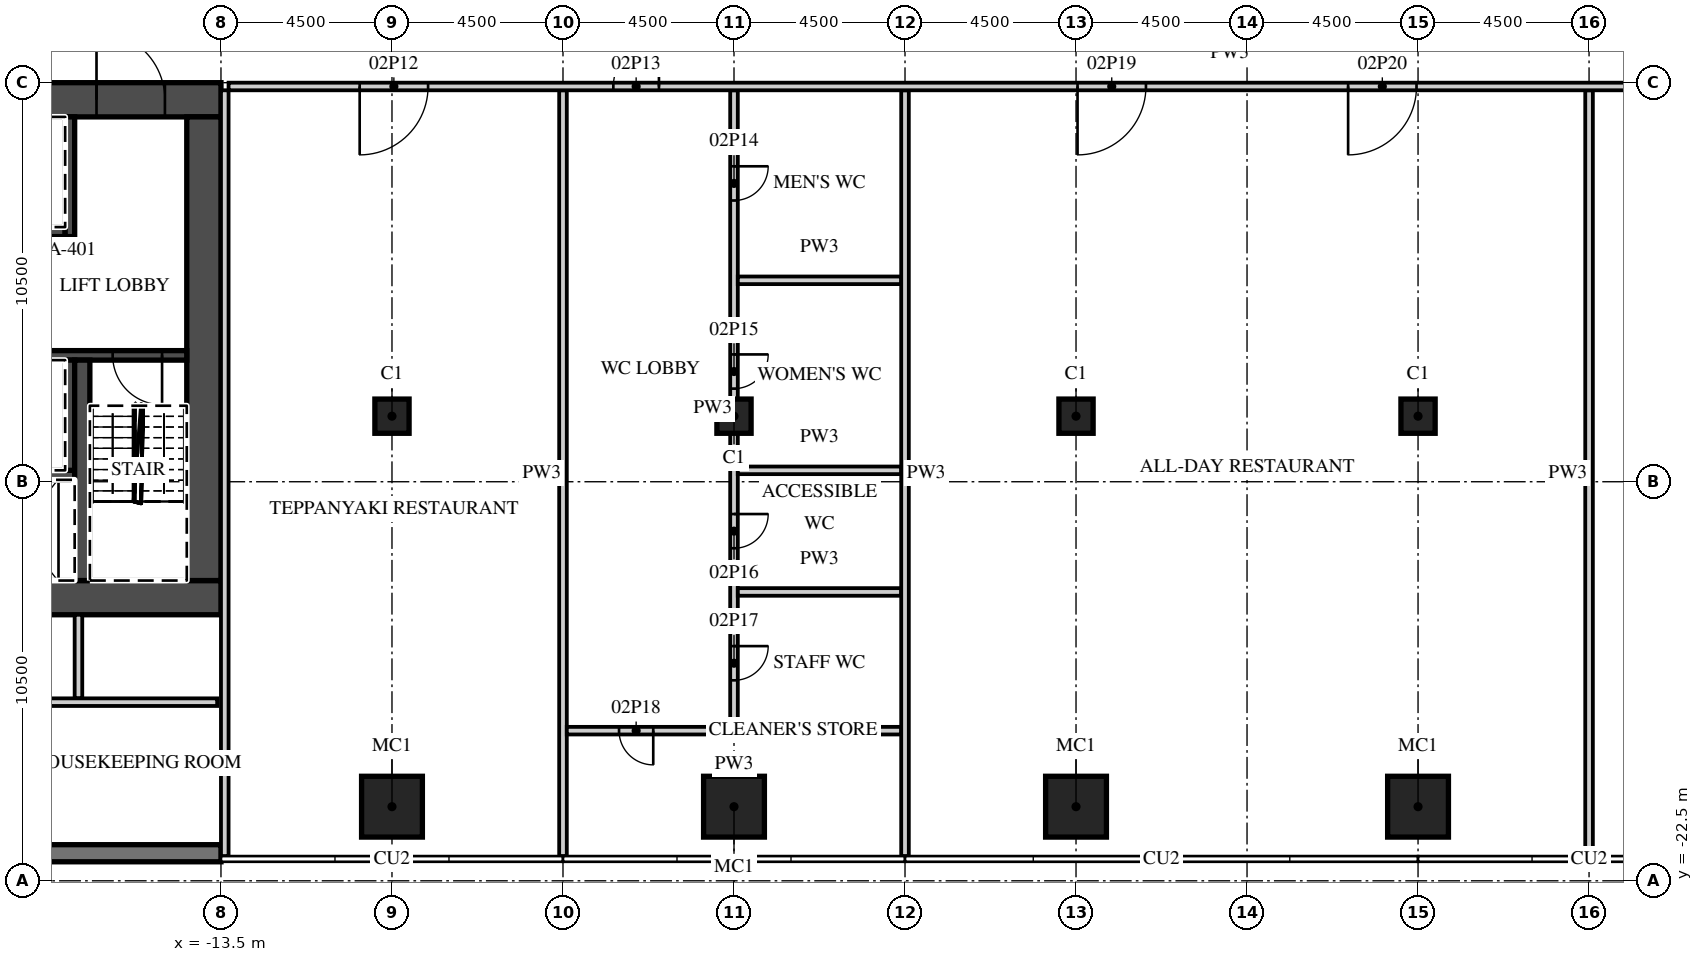
"""IFC4 building model, lengths in metres.
Left out: names, types, materials, properties, quantities, classifications, styles, units other than length and angle.
Written with IfcOpenShell. Run it as: python <this file> out.ifc"""

import sys

from ifc_helpers import new_model, si_unit, direction, frame, frame_2d, origin, origin_2d, place, context, subcontext, project, spatial, rectangle, extrude, element, fill, save


model = new_model("IFC4")
c1 = context("Model", 3, precision=1e-05, world=origin(), true_north=direction((0.0, 1.0)))
c2 = subcontext(c1, "Body", "Model", "MODEL_VIEW")
j1 = project(units=[si_unit("LENGTHUNIT", "METRE"), si_unit("PLANEANGLEUNIT", "RADIAN")], contexts=[c1])
p1 = place(None, origin())
s1 = spatial("IfcSite", under=j1, at=p1, CompositionType="ELEMENT")
p2 = place(p1, origin())
s2 = spatial("IfcBuilding", under=s1, at=p2, CompositionType="ELEMENT")
p3 = place(p2, frame((0.0, 0.0, 17.0)))
s3 = spatial("IfcBuildingStorey", under=s2, at=p3, CompositionType="ELEMENT", Elevation=17.0)
for number, where, z_axis, x_axis in (
    (1, (-9.0, -20.55, 0.0), (0.0, 0.0, 1.0), (1.0, 0.0, 0.0)),
    (2, (0.0, -20.55, 0.0), (0.0, 0.0, 1.0), (1.0, 0.0, 0.0)),
    (3, (9.0, -20.55, 0.0), (0.0, 0.0, 1.0), (1.0, 0.0, 0.0)),
    (4, (18.0, -20.55, 0.0), (0.0, 0.0, 1.0), (1.0, 0.0, 0.0)),
):
    element("IfcColumn", number, at=place(p3, frame(where, z_axis=z_axis, x_axis=x_axis)), inside=s3, PredefinedType="COLUMN", context=c2, shape_type="SweptSolid", body=[
        extrude(rectangle(XDim=1.6, YDim=1.6, at=origin_2d()), origin(), (0.0, 0.0, 1.0), 6.5),
    ])
for number, where, z_axis, x_axis in (
    (5, (-9.0, -10.275, 0.0), (0.0, 0.0, 1.0), (1.0, 0.0, 0.0)),
    (6, (0.0, -10.275, 0.0), (0.0, 0.0, 1.0), (1.0, 0.0, 0.0)),
    (7, (9.0, -10.275, 0.0), (0.0, 0.0, 1.0), (1.0, 0.0, 0.0)),
    (8, (18.0, -10.275, 0.0), (0.0, 0.0, 1.0), (1.0, 0.0, 0.0)),
):
    element("IfcColumn", number, at=place(p3, frame(where, z_axis=z_axis, x_axis=x_axis)), inside=s3, PredefinedType="COLUMN", context=c2, shape_type="SweptSolid", body=[
        extrude(rectangle(XDim=0.9, YDim=0.9, at=origin_2d()), origin(), (0.0, 0.0, 1.0), 6.5),
    ])
p4 = place(p3, frame((-31.5, -21.775, 0.0), z_axis=(0.0, 0.0, 1.0), x_axis=(1.0, 0.0, 0.0)))
e9 = element("IfcWall", 9, at=p4, inside=s3, PredefinedType="SOLIDWALL", context=c2, shape_type="SweptSolid", body=[
    extrude(rectangle(XDim=18.0, YDim=0.45, at=frame_2d((9.0, 0.0))), origin(), (0.0, 0.0, 1.0), 6.05),
])
p5 = place(p3, frame((-31.5, -1.95, 0.0), z_axis=(0.0, 0.0, 1.0), x_axis=(1.0, 0.0, 0.0)))
e10 = element("IfcWall", 10, at=p5, inside=s3, PredefinedType="SHEAR", context=c2, shape_type="SweptSolid", body=[
    extrude(rectangle(XDim=18.0, YDim=0.9, at=frame_2d((9.0, 0.0))), origin(), (0.0, 0.0, 1.0), 6.05),
])
p6 = place(p5, frame((14.725, 0.0, 0.0)))
e11 = element("IfcOpeningElement", 11, at=p6, cuts=e10, PredefinedType="OPENING", context=c2, shape_type="SweptSolid", body=[
    extrude(rectangle(XDim=1.8, YDim=2.1, at=frame_2d((0.9, 1.05))), frame((0.0, 0.46, 0.0), z_axis=(0.0, -1.0, 0.0), x_axis=(1.0, 0.0, 0.0)), (0.0, 0.0, 1.0), 0.92),
])
p7 = place(p3, frame((-20.3, -15.05, 0.0), z_axis=(0.0, 0.0, 1.0), x_axis=(1.0, 0.0, 0.0)))
e12 = element("IfcWall", 12, at=p7, inside=s3, PredefinedType="SHEAR", context=c2, shape_type="SweptSolid", body=[
    extrude(rectangle(XDim=6.8, YDim=0.9, at=frame_2d((3.4, 0.0))), origin(), (0.0, 0.0, 1.0), 6.05),
])
p8 = place(p7, frame((0.875, 0.0, 0.0)))
e13 = element("IfcOpeningElement", 13, at=p8, cuts=e12, PredefinedType="OPENING", context=c2, shape_type="SweptSolid", body=[
    extrude(rectangle(XDim=1.2, YDim=2.1, at=frame_2d((0.6, 1.05))), frame((0.0, 0.46, 0.0), z_axis=(0.0, -1.0, 0.0), x_axis=(1.0, 0.0, 0.0)), (0.0, 0.0, 1.0), 0.92),
])
p9 = place(p3, frame((-13.95, -14.6, 0.0), z_axis=(0.0, 0.0, 1.0), x_axis=(0.0, 1.0, 0.0)))
e14 = element("IfcWall", 14, at=p9, inside=s3, PredefinedType="SHEAR", context=c2, shape_type="SweptSolid", body=[
    extrude(rectangle(XDim=12.2, YDim=0.9, at=frame_2d((6.1, 0.0))), origin(), (0.0, 0.0, 1.0), 6.05),
])
p10 = place(p3, frame((-30.6, -5.425, 0.0), z_axis=(0.0, 0.0, 1.0), x_axis=(1.0, 0.0, 0.0)))
e15 = element("IfcWall", 15, at=p10, inside=s3, PredefinedType="SHEAR", context=c2, shape_type="SweptSolid", body=[
    extrude(rectangle(XDim=13.0, YDim=0.25, at=frame_2d((6.5, 0.0))), origin(), (0.0, 0.0, 1.0), 6.05),
])
p11 = place(p3, frame((-17.475, -5.55, 0.0), z_axis=(0.0, 0.0, 1.0), x_axis=(0.0, 1.0, 0.0)))
e16 = element("IfcWall", 16, at=p11, inside=s3, PredefinedType="SHEAR", context=c2, shape_type="SweptSolid", body=[
    extrude(rectangle(XDim=3.15, YDim=0.25, at=frame_2d((1.575, 0.0))), origin(), (0.0, 0.0, 1.0), 6.05),
])
p12 = place(p3, frame((-30.6, -8.675, 0.0), z_axis=(0.0, 0.0, 1.0), x_axis=(1.0, 0.0, 0.0)))
e17 = element("IfcWall", 17, at=p12, inside=s3, PredefinedType="SHEAR", context=c2, shape_type="SweptSolid", body=[
    extrude(rectangle(XDim=16.2, YDim=0.25, at=frame_2d((8.1, 0.0))), origin(), (0.0, 0.0, 1.0), 6.05),
])
p13 = place(p12, frame((0.6, 0.0, 0.0)))
e18 = element("IfcOpeningElement", 18, at=p13, cuts=e17, PredefinedType="OPENING", context=c2, shape_type="SweptSolid", body=[
    extrude(rectangle(XDim=1.2, YDim=2.1, at=frame_2d((0.6, 1.05))), frame((0.0, 0.135, 0.0), z_axis=(0.0, -1.0, 0.0), x_axis=(1.0, 0.0, 0.0)), (0.0, 0.0, 1.0), 0.27),
])
p14 = place(p12, frame((3.25, 0.0, 0.0)))
e19 = element("IfcOpeningElement", 19, at=p14, cuts=e17, PredefinedType="OPENING", context=c2, shape_type="SweptSolid", body=[
    extrude(rectangle(XDim=1.2, YDim=2.1, at=frame_2d((0.6, 1.05))), frame((0.0, 0.135, 0.0), z_axis=(0.0, -1.0, 0.0), x_axis=(1.0, 0.0, 0.0)), (0.0, 0.0, 1.0), 0.27),
])
p15 = place(p12, frame((5.9, 0.0, 0.0)))
e20 = element("IfcOpeningElement", 20, at=p15, cuts=e17, PredefinedType="OPENING", context=c2, shape_type="SweptSolid", body=[
    extrude(rectangle(XDim=1.2, YDim=2.1, at=frame_2d((0.6, 1.05))), frame((0.0, 0.135, 0.0), z_axis=(0.0, -1.0, 0.0), x_axis=(1.0, 0.0, 0.0)), (0.0, 0.0, 1.0), 0.27),
])
p16 = place(p12, frame((14.25, 0.0, 0.0)))
e21 = element("IfcOpeningElement", 21, at=p16, cuts=e17, PredefinedType="OPENING", context=c2, shape_type="SweptSolid", body=[
    extrude(rectangle(XDim=1.3, YDim=2.1, at=frame_2d((0.65, 1.05))), frame((0.0, 0.135, 0.0), z_axis=(0.0, -1.0, 0.0), x_axis=(1.0, 0.0, 0.0)), (0.0, 0.0, 1.0), 0.27),
])
p17 = place(p3, frame((-30.6, -11.825, 0.0), z_axis=(0.0, 0.0, 1.0), x_axis=(1.0, 0.0, 0.0)))
e22 = element("IfcWall", 22, at=p17, inside=s3, PredefinedType="SHEAR", context=c2, shape_type="SweptSolid", body=[
    extrude(rectangle(XDim=13.25, YDim=0.25, at=frame_2d((6.625, 0.0))), origin(), (0.0, 0.0, 1.0), 6.05),
])
p18 = place(p3, frame((-17.475, -11.7, 0.0), z_axis=(0.0, 0.0, 1.0), x_axis=(0.0, 1.0, 0.0)))
e23 = element("IfcWall", 23, at=p18, inside=s3, PredefinedType="SHEAR", context=c2, shape_type="SweptSolid", body=[
    extrude(rectangle(XDim=2.9, YDim=0.25, at=frame_2d((1.45, 0.0))), origin(), (0.0, 0.0, 1.0), 6.05),
])
p19 = place(p3, frame((-17.15, -14.6, 0.0), z_axis=(0.0, 0.0, 1.0), x_axis=(0.0, 1.0, 0.0)))
e24 = element("IfcWall", 24, at=p19, inside=s3, PredefinedType="SHEAR", context=c2, shape_type="SweptSolid", body=[
    extrude(rectangle(XDim=5.8, YDim=0.4, at=frame_2d((2.9, 0.0))), origin(), (0.0, 0.0, 1.0), 6.05),
])
p20 = place(p3, frame((-17.25, -17.7, 0.0), z_axis=(0.0, 0.0, 1.0), x_axis=(0.0, 1.0, 0.0)))
e25 = element("IfcWall", 25, at=p20, inside=s3, PredefinedType="PARTITIONING", context=c2, shape_type="SweptSolid", body=[
    extrude(rectangle(XDim=2.2, YDim=0.2, at=frame_2d((1.1, 0.0))), origin(), (0.0, 0.0, 1.0), 6.05),
])
p21 = place(p3, frame((-44.55, -17.8, 0.0), z_axis=(0.0, 0.0, 1.0), x_axis=(1.0, 0.0, 0.0)))
e26 = element("IfcWall", 26, at=p21, inside=s3, PredefinedType="PARTITIONING", context=c2, shape_type="SweptSolid", body=[
    extrude(rectangle(XDim=30.95, YDim=0.2, at=frame_2d((15.475, 0.0))), origin(), (0.0, 0.0, 1.0), 6.05),
])
p22 = place(p21, frame((12.238, 0.0, 0.0)))
e27 = element("IfcOpeningElement", 27, at=p22, cuts=e26, PredefinedType="OPENING", context=c2, shape_type="SweptSolid", body=[
    extrude(rectangle(XDim=0.9, YDim=2.1, at=frame_2d((0.45, 1.05))), frame((0.0, 0.11, 0.0), z_axis=(0.0, -1.0, 0.0), x_axis=(1.0, 0.0, 0.0)), (0.0, 0.0, 1.0), 0.22),
])
p23 = place(p21, frame((20.538, 0.0, 0.0)))
e28 = element("IfcOpeningElement", 28, at=p23, cuts=e26, PredefinedType="OPENING", context=c2, shape_type="SweptSolid", body=[
    extrude(rectangle(XDim=0.9, YDim=2.1, at=frame_2d((0.45, 1.05))), frame((0.0, 0.11, 0.0), z_axis=(0.0, -1.0, 0.0), x_axis=(1.0, 0.0, 0.0)), (0.0, 0.0, 1.0), 0.22),
])
p24 = place(p3, frame((-4.5, -21.85, 0.0), z_axis=(0.0, 0.0, 1.0), x_axis=(0.0, 1.0, 0.0)))
e29 = element("IfcWall", 29, at=p24, inside=s3, PredefinedType="PARTITIONING", context=c2, shape_type="SweptSolid", body=[
    extrude(rectangle(XDim=20.15, YDim=0.2, at=frame_2d((10.075, 0.0))), origin(), (0.0, 0.0, 1.0), 6.05),
])
p25 = place(p3, frame((0.0, -18.45, 0.0), z_axis=(0.0, 0.0, 1.0), x_axis=(0.0, 1.0, 0.0)))
e30 = element("IfcWall", 30, at=p25, inside=s3, PredefinedType="PARTITIONING", context=c2, shape_type="SweptSolid", body=[
    extrude(rectangle(XDim=16.75, YDim=0.2, at=frame_2d((8.375, 0.0))), origin(), (0.0, 0.0, 1.0), 6.05),
])
p26 = place(p25, frame((13.85, 0.0, 0.0)))
e31 = element("IfcOpeningElement", 31, at=p26, cuts=e30, PredefinedType="OPENING", context=c2, shape_type="SweptSolid", body=[
    extrude(rectangle(XDim=0.9, YDim=2.1, at=frame_2d((0.45, 1.05))), frame((0.0, 0.11, 0.0), z_axis=(0.0, -1.0, 0.0), x_axis=(1.0, 0.0, 0.0)), (0.0, 0.0, 1.0), 0.22),
])
p27 = place(p25, frame((8.9, 0.0, 0.0)))
e32 = element("IfcOpeningElement", 32, at=p27, cuts=e30, PredefinedType="OPENING", context=c2, shape_type="SweptSolid", body=[
    extrude(rectangle(XDim=0.9, YDim=2.1, at=frame_2d((0.45, 1.05))), frame((0.0, 0.11, 0.0), z_axis=(0.0, -1.0, 0.0), x_axis=(1.0, 0.0, 0.0)), (0.0, 0.0, 1.0), 0.22),
])
p28 = place(p25, frame((4.7, 0.0, 0.0)))
e33 = element("IfcOpeningElement", 33, at=p28, cuts=e30, PredefinedType="OPENING", context=c2, shape_type="SweptSolid", body=[
    extrude(rectangle(XDim=0.9, YDim=2.1, at=frame_2d((0.45, 1.05))), frame((0.0, 0.11, 0.0), z_axis=(0.0, -1.0, 0.0), x_axis=(1.0, 0.0, 0.0)), (0.0, 0.0, 1.0), 0.22),
])
p29 = place(p25, frame((1.225, 0.0, 0.0)))
e34 = element("IfcOpeningElement", 34, at=p29, cuts=e30, PredefinedType="OPENING", context=c2, shape_type="SweptSolid", body=[
    extrude(rectangle(XDim=0.9, YDim=2.1, at=frame_2d((0.45, 1.05))), frame((0.0, 0.11, 0.0), z_axis=(0.0, -1.0, 0.0), x_axis=(1.0, 0.0, 0.0)), (0.0, 0.0, 1.0), 0.22),
])
for number, where, z_axis, x_axis in (
    (35, (0.1, -6.7, 0.0), (0.0, 0.0, 1.0), (1.0, 0.0, 0.0)),
    (36, (0.1, -11.7, 0.0), (0.0, 0.0, 1.0), (1.0, 0.0, 0.0)),
    (37, (0.1, -14.9, 0.0), (0.0, 0.0, 1.0), (1.0, 0.0, 0.0)),
):
    element("IfcWall", number, at=place(p3, frame(where, z_axis=z_axis, x_axis=x_axis)), inside=s3, PredefinedType="PARTITIONING", context=c2, shape_type="SweptSolid", body=[
        extrude(rectangle(XDim=4.3, YDim=0.2, at=frame_2d((2.15, 0.0))), origin(), (0.0, 0.0, 1.0), 6.05),
    ])
p30 = place(p3, frame((-4.4, -18.55, 0.0), z_axis=(0.0, 0.0, 1.0), x_axis=(1.0, 0.0, 0.0)))
e38 = element("IfcWall", 38, at=p30, inside=s3, PredefinedType="PARTITIONING", context=c2, shape_type="SweptSolid", body=[
    extrude(rectangle(XDim=8.8, YDim=0.2, at=frame_2d((4.4, 0.0))), origin(), (0.0, 0.0, 1.0), 6.05),
])
p31 = place(p30, frame((1.375, 0.0, 0.0)))
e39 = element("IfcOpeningElement", 39, at=p31, cuts=e38, PredefinedType="OPENING", context=c2, shape_type="SweptSolid", body=[
    extrude(rectangle(XDim=0.9, YDim=2.1, at=frame_2d((0.45, 1.05))), frame((0.0, 0.11, 0.0), z_axis=(0.0, -1.0, 0.0), x_axis=(1.0, 0.0, 0.0)), (0.0, 0.0, 1.0), 0.22),
])
for number, where, z_axis, x_axis in (
    (40, (4.5, -21.85, 0.0), (0.0, 0.0, 1.0), (0.0, 1.0, 0.0)),
    (41, (22.5, -21.85, 0.0), (0.0, 0.0, 1.0), (0.0, 1.0, 0.0)),
):
    element("IfcWall", number, at=place(p3, frame(where, z_axis=z_axis, x_axis=x_axis)), inside=s3, PredefinedType="PARTITIONING", context=c2, shape_type="SweptSolid", body=[
        extrude(rectangle(XDim=20.15, YDim=0.2, at=frame_2d((10.075, 0.0))), origin(), (0.0, 0.0, 1.0), 6.05),
    ])
p32 = place(p3, frame((-13.3, -1.6, 0.0), z_axis=(0.0, 0.0, 1.0), x_axis=(1.0, 0.0, 0.0)))
e42 = element("IfcWall", 42, at=p32, inside=s3, PredefinedType="PARTITIONING", context=c2, shape_type="SweptSolid", body=[
    extrude(rectangle(XDim=52.7, YDim=0.2, at=frame_2d((26.35, 0.0))), origin(), (0.0, 0.0, 1.0), 6.05),
])
p33 = place(p32, frame((3.45, 0.0, 0.0)))
e43 = element("IfcOpeningElement", 43, at=p33, cuts=e42, PredefinedType="OPENING", context=c2, shape_type="SweptSolid", body=[
    extrude(rectangle(XDim=1.8, YDim=2.1, at=frame_2d((0.9, 1.05))), frame((0.0, 0.11, 0.0), z_axis=(0.0, -1.0, 0.0), x_axis=(1.0, 0.0, 0.0)), (0.0, 0.0, 1.0), 0.22),
])
p34 = place(p32, frame((10.125, 0.0, 0.0)))
e44 = element("IfcOpeningElement", 44, at=p34, cuts=e42, PredefinedType="OPENING", context=c2, shape_type="SweptSolid", body=[
    extrude(rectangle(XDim=1.2, YDim=2.1, at=frame_2d((0.6, 1.05))), frame((0.0, 0.11, 0.0), z_axis=(0.0, -1.0, 0.0), x_axis=(1.0, 0.0, 0.0)), (0.0, 0.0, 1.0), 0.22),
])
p35 = place(p32, frame((22.34, 0.0, 0.0)))
e45 = element("IfcOpeningElement", 45, at=p35, cuts=e42, PredefinedType="OPENING", context=c2, shape_type="SweptSolid", body=[
    extrude(rectangle(XDim=1.8, YDim=2.1, at=frame_2d((0.9, 1.05))), frame((0.0, 0.11, 0.0), z_axis=(0.0, -1.0, 0.0), x_axis=(1.0, 0.0, 0.0)), (0.0, 0.0, 1.0), 0.22),
])
p36 = place(p32, frame((29.46, 0.0, 0.0)))
e46 = element("IfcOpeningElement", 46, at=p36, cuts=e42, PredefinedType="OPENING", context=c2, shape_type="SweptSolid", body=[
    extrude(rectangle(XDim=1.8, YDim=2.1, at=frame_2d((0.9, 1.05))), frame((0.0, 0.11, 0.0), z_axis=(0.0, -1.0, 0.0), x_axis=(1.0, 0.0, 0.0)), (0.0, 0.0, 1.0), 0.22),
])
p37 = place(p32, frame((39.4, 0.0, 0.0)))
e47 = element("IfcOpeningElement", 47, at=p37, cuts=e42, PredefinedType="OPENING", context=c2, shape_type="SweptSolid", body=[
    extrude(rectangle(XDim=1.8, YDim=2.1, at=frame_2d((0.9, 1.05))), frame((0.0, 0.11, 0.0), z_axis=(0.0, -1.0, 0.0), x_axis=(1.0, 0.0, 0.0)), (0.0, 0.0, 1.0), 0.22),
])
p38 = place(p32, frame((46.2, 0.0, 0.0)))
e48 = element("IfcOpeningElement", 48, at=p38, cuts=e42, PredefinedType="OPENING", context=c2, shape_type="SweptSolid", body=[
    extrude(rectangle(XDim=1.8, YDim=2.1, at=frame_2d((0.9, 1.05))), frame((0.0, 0.11, 0.0), z_axis=(0.0, -1.0, 0.0), x_axis=(1.0, 0.0, 0.0)), (0.0, 0.0, 1.0), 0.22),
])
p39 = place(p32, frame((49.6, 0.0, 0.0)))
e49 = element("IfcOpeningElement", 49, at=p39, cuts=e42, PredefinedType="OPENING", context=c2, shape_type="SweptSolid", body=[
    extrude(rectangle(XDim=1.8, YDim=2.1, at=frame_2d((0.9, 1.05))), frame((0.0, 0.11, 0.0), z_axis=(0.0, -1.0, 0.0), x_axis=(1.0, 0.0, 0.0)), (0.0, 0.0, 1.0), 0.22),
])
p40 = place(p3, frame((-13.4, -21.85, 0.0), z_axis=(0.0, 0.0, 1.0), x_axis=(0.0, 1.0, 0.0)))
e50 = element("IfcWall", 50, at=p40, inside=s3, PredefinedType="PARTITIONING", context=c2, shape_type="SweptSolid", body=[
    extrude(rectangle(XDim=20.15, YDim=0.2, at=frame_2d((10.075, 0.0))), origin(), (0.0, 0.0, 1.0), 6.05),
])
p41 = place(p6, origin())
e51 = element("IfcDoor", 51, at=p41, inside=s3, OperationType="DOUBLE_DOOR_DOUBLE_SWING", PredefinedType="DOOR", context=c2, shape_type="SweptSolid", body=[
    extrude(rectangle(XDim=1.8, YDim=2.1, at=frame_2d((0.9, 1.05))), frame((0.0, 0.025, 0.0), z_axis=(0.0, -1.0, 0.0), x_axis=(1.0, 0.0, 0.0)), (0.0, 0.0, 1.0), 0.05),
])
fill(e11, e51)
p42 = place(p16, origin())
e52 = element("IfcDoor", 52, at=p42, inside=s3, OperationType="SINGLE_SWING_RIGHT", PredefinedType="DOOR", context=c2, shape_type="SweptSolid", body=[
    extrude(rectangle(XDim=1.3, YDim=2.1, at=frame_2d((0.65, 1.05))), frame((0.0, 0.025, 0.0), z_axis=(0.0, -1.0, 0.0), x_axis=(1.0, 0.0, 0.0)), (0.0, 0.0, 1.0), 0.05),
])
fill(e21, e52)
p43 = place(p33, origin())
e53 = element("IfcDoor", 53, at=p43, inside=s3, OperationType="DOUBLE_DOOR_DOUBLE_SWING", PredefinedType="DOOR", context=c2, shape_type="SweptSolid", body=[
    extrude(rectangle(XDim=1.8, YDim=2.1, at=frame_2d((0.9, 1.05))), frame((0.0, 0.025, 0.0), z_axis=(0.0, -1.0, 0.0), x_axis=(1.0, 0.0, 0.0)), (0.0, 0.0, 1.0), 0.05),
])
fill(e43, e53)
p44 = place(p34, origin())
e54 = element("IfcDoor", 54, at=p44, inside=s3, OperationType="SINGLE_SWING_RIGHT", PredefinedType="DOOR", context=c2, shape_type="SweptSolid", body=[
    extrude(rectangle(XDim=1.2, YDim=2.1, at=frame_2d((0.6, 1.05))), frame((0.0, 0.025, 0.0), z_axis=(0.0, -1.0, 0.0), x_axis=(1.0, 0.0, 0.0)), (0.0, 0.0, 1.0), 0.05),
])
fill(e44, e54)
p45 = place(p26, origin())
e55 = element("IfcDoor", 55, at=p45, inside=s3, OperationType="SINGLE_SWING_RIGHT", PredefinedType="DOOR", context=c2, shape_type="SweptSolid", body=[
    extrude(rectangle(XDim=0.9, YDim=2.1, at=frame_2d((0.45, 1.05))), frame((0.0, 0.025, 0.0), z_axis=(0.0, -1.0, 0.0), x_axis=(1.0, 0.0, 0.0)), (0.0, 0.0, 1.0), 0.05),
])
fill(e31, e55)
p46 = place(p27, origin())
e56 = element("IfcDoor", 56, at=p46, inside=s3, OperationType="SINGLE_SWING_RIGHT", PredefinedType="DOOR", context=c2, shape_type="SweptSolid", body=[
    extrude(rectangle(XDim=0.9, YDim=2.1, at=frame_2d((0.45, 1.05))), frame((0.0, 0.025, 0.0), z_axis=(0.0, -1.0, 0.0), x_axis=(1.0, 0.0, 0.0)), (0.0, 0.0, 1.0), 0.05),
])
fill(e32, e56)
p47 = place(p28, origin())
e57 = element("IfcDoor", 57, at=p47, inside=s3, OperationType="SINGLE_SWING_RIGHT", PredefinedType="DOOR", context=c2, shape_type="SweptSolid", body=[
    extrude(rectangle(XDim=0.9, YDim=2.1, at=frame_2d((0.45, 1.05))), frame((0.0, 0.025, 0.0), z_axis=(0.0, -1.0, 0.0), x_axis=(1.0, 0.0, 0.0)), (0.0, 0.0, 1.0), 0.05),
])
fill(e33, e57)
p48 = place(p29, origin())
e58 = element("IfcDoor", 58, at=p48, inside=s3, OperationType="SINGLE_SWING_RIGHT", PredefinedType="DOOR", context=c2, shape_type="SweptSolid", body=[
    extrude(rectangle(XDim=0.9, YDim=2.1, at=frame_2d((0.45, 1.05))), frame((0.0, 0.025, 0.0), z_axis=(0.0, -1.0, 0.0), x_axis=(1.0, 0.0, 0.0)), (0.0, 0.0, 1.0), 0.05),
])
fill(e34, e58)
p49 = place(p31, origin())
e59 = element("IfcDoor", 59, at=p49, inside=s3, OperationType="SINGLE_SWING_RIGHT", PredefinedType="DOOR", context=c2, shape_type="SweptSolid", body=[
    extrude(rectangle(XDim=0.9, YDim=2.1, at=frame_2d((0.45, 1.05))), frame((0.0, 0.025, 0.0), z_axis=(0.0, -1.0, 0.0), x_axis=(1.0, 0.0, 0.0)), (0.0, 0.0, 1.0), 0.05),
])
fill(e39, e59)
p50 = place(p35, origin())
e60 = element("IfcDoor", 60, at=p50, inside=s3, OperationType="DOUBLE_DOOR_DOUBLE_SWING", PredefinedType="DOOR", context=c2, shape_type="SweptSolid", body=[
    extrude(rectangle(XDim=1.8, YDim=2.1, at=frame_2d((0.9, 1.05))), frame((0.0, 0.025, 0.0), z_axis=(0.0, -1.0, 0.0), x_axis=(1.0, 0.0, 0.0)), (0.0, 0.0, 1.0), 0.05),
])
fill(e45, e60)
p51 = place(p36, origin())
e61 = element("IfcDoor", 61, at=p51, inside=s3, OperationType="DOUBLE_DOOR_DOUBLE_SWING", PredefinedType="DOOR", context=c2, shape_type="SweptSolid", body=[
    extrude(rectangle(XDim=1.8, YDim=2.1, at=frame_2d((0.9, 1.05))), frame((0.0, 0.025, 0.0), z_axis=(0.0, -1.0, 0.0), x_axis=(1.0, 0.0, 0.0)), (0.0, 0.0, 1.0), 0.05),
])
fill(e46, e61)
save(model, sys.argv[1])
